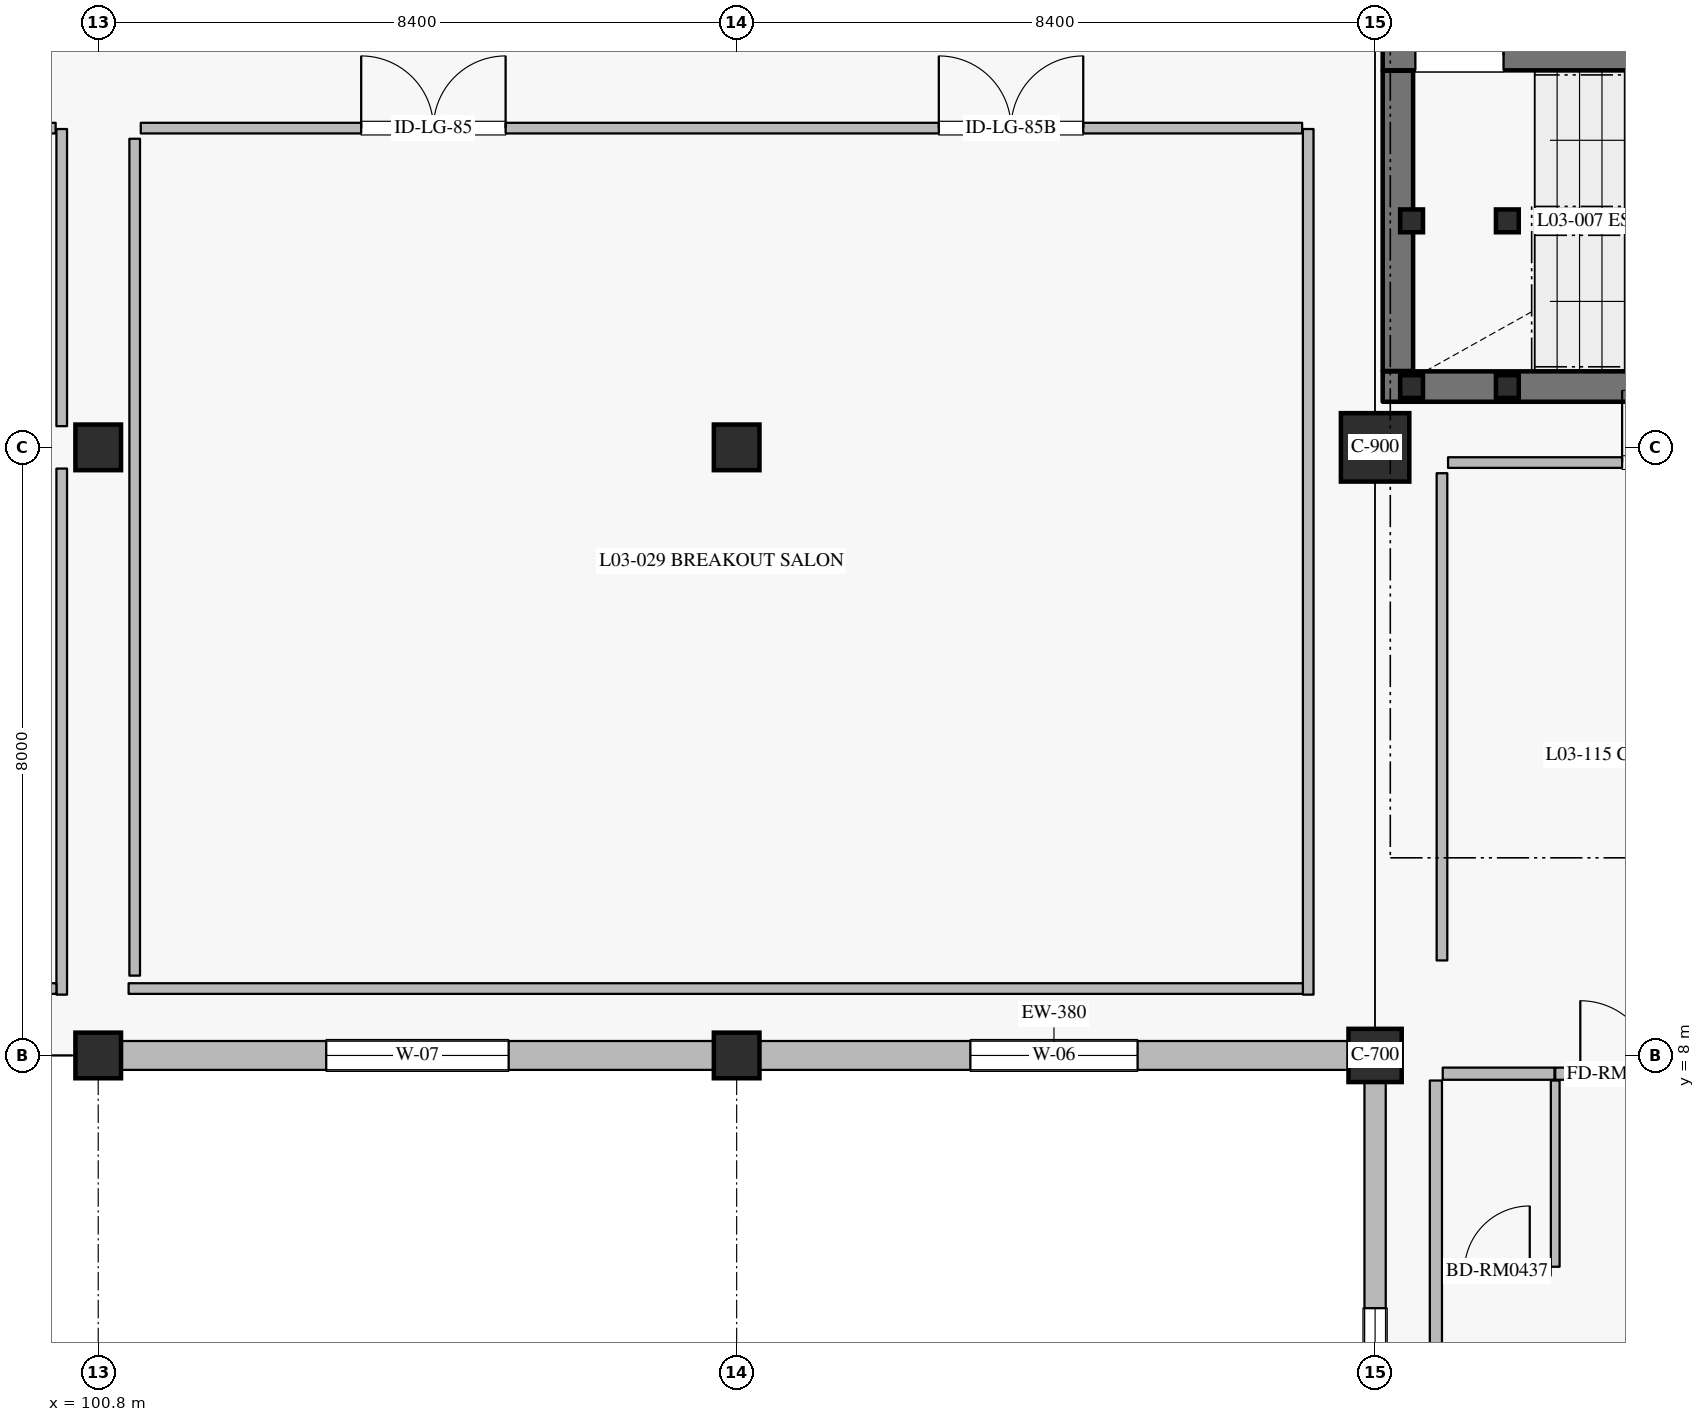
"""IFC4 building model, lengths in metres.
Left out: names, types, materials, properties, quantities, classifications, styles, units other than length and angle.
Written with IfcOpenShell. Run it as: python <this file> out.ifc"""

import sys

from ifc_helpers import new_model, si_unit, direction, frame, frame_2d, origin, origin_2d, place, context, subcontext, project, spatial, rectangle, hollow_rectangle, extrude, element, fill, save


model = new_model("IFC4")
c1 = context("Model", 3, precision=1e-05, world=origin(), true_north=direction((0.0, 1.0)))
c2 = subcontext(c1, "Body", "Model", "MODEL_VIEW")
j1 = project(units=[si_unit("LENGTHUNIT", "METRE"), si_unit("PLANEANGLEUNIT", "RADIAN")], contexts=[c1])
p1 = place(None, origin())
s1 = spatial("IfcSite", under=j1, at=p1, CompositionType="ELEMENT")
p2 = place(p1, origin())
s2 = spatial("IfcBuilding", under=s1, at=p2, CompositionType="ELEMENT")
p3 = place(p2, frame((0.0, 0.0, 16.2)))
s3 = spatial("IfcBuildingStorey", under=s2, at=p3, CompositionType="ELEMENT", Elevation=16.2)
for number, where, z_axis, x_axis in (
    (1, (100.8, 8.0, 0.0), (0.0, 0.0, 1.0), (1.0, 0.0, 0.0)),
    (2, (100.8, 16.0, 0.0), (0.0, 0.0, 1.0), (1.0, 0.0, 0.0)),
    (3, (109.2, 8.0, 0.0), (0.0, 0.0, 1.0), (1.0, 0.0, 0.0)),
    (4, (109.2, 16.0, 0.0), (0.0, 0.0, 1.0), (1.0, 0.0, 0.0)),
):
    element("IfcColumn", number, at=place(p3, frame(where, z_axis=z_axis, x_axis=x_axis)), inside=s3, PredefinedType="COLUMN", context=c2, shape_type="SweptSolid", body=[
        extrude(rectangle(XDim=0.6, YDim=0.6, at=origin_2d()), origin(), (0.0, 0.0, 1.0), 4.8),
    ])
p4 = place(p3, frame((117.6, 16.0, 0.0), z_axis=(0.0, 0.0, 1.0), x_axis=(1.0, 0.0, 0.0)))
e5 = element("IfcColumn", 5, at=p4, inside=s3, PredefinedType="COLUMN", context=c2, shape_type="SweptSolid", body=[
    extrude(rectangle(XDim=0.9, YDim=0.9, at=origin_2d()), origin(), (0.0, 0.0, 1.0), 4.8),
])
p5 = place(p3, frame((117.6, 8.0, 0.0), z_axis=(0.0, 0.0, 1.0), x_axis=(1.0, 0.0, 0.0)))
e6 = element("IfcColumn", 6, at=p5, inside=s3, PredefinedType="COLUMN", context=c2, shape_type="SweptSolid", body=[
    extrude(rectangle(XDim=0.7, YDim=0.7, at=origin_2d()), origin(), (0.0, 0.0, 1.0), 4.8),
])
p6 = place(p3, frame((117.25, 8.0, 0.0), z_axis=(0.0, 0.0, 1.0), x_axis=(-1.0, 0.0, 0.0)))
e7 = element("IfcWall", 7, at=p6, inside=s3, PredefinedType="SOLIDWALL", context=c2, shape_type="SweptSolid", body=[
    extrude(rectangle(XDim=7.75, YDim=0.38, at=frame_2d((3.875, 0.0))), origin(), (0.0, 0.0, 1.0), 3.84),
])
p7 = place(p6, frame((2.775, 0.0, 0.95)))
e8 = element("IfcOpeningElement", 8, at=p7, cuts=e7, PredefinedType="OPENING", context=c2, shape_type="SweptSolid", body=[
    extrude(rectangle(XDim=2.2, YDim=1.75, at=frame_2d((1.1, 0.875))), frame((0.0, 0.2, 0.0), z_axis=(0.0, -1.0, 0.0), x_axis=(1.0, 0.0, 0.0)), (0.0, 0.0, 1.0), 0.4),
])
p8 = place(p3, frame((108.9, 8.0, 0.0), z_axis=(0.0, 0.0, 1.0), x_axis=(-1.0, 0.0, 0.0)))
e9 = element("IfcWall", 9, at=p8, inside=s3, PredefinedType="SOLIDWALL", context=c2, shape_type="SweptSolid", body=[
    extrude(rectangle(XDim=7.8, YDim=0.38, at=frame_2d((3.9, 0.0))), origin(), (0.0, 0.0, 1.0), 3.84),
])
p9 = place(p8, frame((2.7, 0.0, 0.95)))
e10 = element("IfcOpeningElement", 10, at=p9, cuts=e9, PredefinedType="OPENING", context=c2, shape_type="SweptSolid", body=[
    extrude(rectangle(XDim=2.4, YDim=1.65, at=frame_2d((1.2, 0.825))), frame((0.0, 0.2, 0.0), z_axis=(0.0, -1.0, 0.0), x_axis=(1.0, 0.0, 0.0)), (0.0, 0.0, 1.0), 0.4),
])
p10 = place(p3, frame((117.6, 0.4, 0.0), z_axis=(0.0, 0.0, 1.0), x_axis=(0.0, 1.0, 0.0)))
e11 = element("IfcWall", 11, at=p10, inside=s3, PredefinedType="SOLIDWALL", context=c2, shape_type="SweptSolid", body=[
    extrude(rectangle(XDim=7.25, YDim=0.28, at=frame_2d((3.625, 0.0))), origin(), (0.0, 0.0, 1.0), 3.9),
])
p11 = place(p10, frame((2.975, 0.0, 0.75)))
e12 = element("IfcOpeningElement", 12, at=p11, cuts=e11, PredefinedType="OPENING", context=c2, shape_type="SweptSolid", body=[
    extrude(rectangle(XDim=1.3, YDim=1.65, at=frame_2d((0.65, 0.825))), frame((0.0, 0.15, 0.0), z_axis=(0.0, -1.0, 0.0), x_axis=(1.0, 0.0, 0.0)), (0.0, 0.0, 1.0), 0.3),
])
p12 = place(p3, frame((117.7, 16.8, 0.0), z_axis=(0.0, 0.0, 1.0), x_axis=(1.0, 0.0, 0.0)))
e13 = element("IfcWall", 13, at=p12, inside=s3, PredefinedType="SHEAR", context=c2, shape_type="SweptSolid", body=[
    extrude(rectangle(XDim=8.2, YDim=0.4, at=frame_2d((4.1, 0.0))), origin(), (0.0, 0.0, 1.0), 4.535),
])
p13 = place(p3, frame((117.7, 21.16, 0.0), z_axis=(0.0, 0.0, 1.0), x_axis=(1.0, 0.0, 0.0)))
e14 = element("IfcWall", 14, at=p13, inside=s3, PredefinedType="SHEAR", context=c2, shape_type="SweptSolid", body=[
    extrude(rectangle(XDim=8.2, YDim=0.4, at=frame_2d((4.1, 0.0))), origin(), (0.0, 0.0, 1.0), 4.535),
])
p14 = place(p13, frame((0.43, 0.0, 0.0)))
e15 = element("IfcOpeningElement", 15, at=p14, cuts=e14, PredefinedType="OPENING", context=c2, shape_type="SweptSolid", body=[
    extrude(rectangle(XDim=1.16, YDim=2.2, at=frame_2d((0.58, 1.1))), frame((0.0, 0.21, 0.0), z_axis=(0.0, -1.0, 0.0), x_axis=(1.0, 0.0, 0.0)), (0.0, 0.0, 1.0), 0.42),
])
p15 = place(p3, frame((117.9, 17.005, 0.0), z_axis=(0.0, 0.0, 1.0), x_axis=(0.0, 1.0, 0.0)))
e16 = element("IfcWall", 16, at=p15, inside=s3, PredefinedType="SHEAR", context=c2, shape_type="SweptSolid", body=[
    extrude(rectangle(XDim=3.95, YDim=0.4, at=frame_2d((1.975, 0.0))), origin(), (0.0, 0.0, 1.0), 4.535),
])
for number, where, z_axis, x_axis in (
    (17, (118.08, 16.8, 0.0), (0.0, 0.0, 1.0), (1.0, 0.0, 0.0)),
    (18, (118.08, 18.98, 0.0), (0.0, 0.0, 1.0), (1.0, 0.0, 0.0)),
    (19, (119.34, 16.8, 0.0), (0.0, 0.0, 1.0), (1.0, 0.0, 0.0)),
    (20, (119.34, 18.98, 0.0), (0.0, 0.0, 1.0), (1.0, 0.0, 0.0)),
):
    element("IfcColumn", number, at=place(p3, frame(where, z_axis=z_axis, x_axis=x_axis)), inside=s3, PredefinedType="COLUMN", context=c2, shape_type="SweptSolid", body=[
        extrude(hollow_rectangle(XDim=0.3, YDim=0.3, WallThickness=0.012, at=origin_2d()), origin(), (0.0, 0.0, 1.0), 4.62),
    ])
p16 = place(p3, frame((118.49, 7.76, 0.0), z_axis=(0.0, 0.0, 1.0), x_axis=(1.0, 0.0, 0.0)))
e21 = element("IfcWall", 21, at=p16, inside=s3, PredefinedType="PARTITIONING", context=c2, shape_type="SweptSolid", body=[
    extrude(rectangle(XDim=1.47, YDim=0.16, at=frame_2d((0.735, 0.0))), origin(), (0.0, 0.0, 1.0), 4.535),
])
p17 = place(p3, frame((119.97, 7.76, 0.0), z_axis=(0.0, 0.0, 1.0), x_axis=(1.0, 0.0, 0.0)))
e22 = element("IfcWall", 22, at=p17, inside=s3, PredefinedType="PARTITIONING", context=c2, shape_type="SweptSolid", body=[
    extrude(rectangle(XDim=1.62, YDim=0.16, at=frame_2d((0.81, 0.0))), origin(), (0.0, 0.0, 1.0), 4.535),
])
p18 = place(p17, frame((0.33, 0.0, 0.0)))
e23 = element("IfcOpeningElement", 23, at=p18, cuts=e22, PredefinedType="OPENING", context=c2, shape_type="SweptSolid", body=[
    extrude(rectangle(XDim=0.96, YDim=2.2, at=frame_2d((0.48, 1.1))), frame((0.0, 0.09, 0.0), z_axis=(0.0, -1.0, 0.0), x_axis=(1.0, 0.0, 0.0)), (0.0, 0.0, 1.0), 0.18),
])
p19 = place(p3, frame((119.97, 5.22, 0.0), z_axis=(0.0, 0.0, 1.0), x_axis=(0.0, 1.0, 0.0)))
e24 = element("IfcWall", 24, at=p19, inside=s3, PredefinedType="PARTITIONING", context=c2, shape_type="SweptSolid", body=[
    extrude(rectangle(XDim=2.45, YDim=0.115, at=frame_2d((1.225, 0.0))), origin(), (0.0, 0.0, 1.0), 4.535),
])
p20 = place(p3, frame((118.5, 5.16, 0.0), z_axis=(0.0, 0.0, 1.0), x_axis=(1.0, 0.0, 0.0)))
e25 = element("IfcWall", 25, at=p20, inside=s3, PredefinedType="PARTITIONING", context=c2, shape_type="SweptSolid", body=[
    extrude(rectangle(XDim=1.41, YDim=0.115, at=frame_2d((0.705, 0.0))), origin(), (0.0, 0.0, 1.0), 4.535),
])
p21 = place(p20, frame((0.275, 0.0, 0.0)))
e26 = element("IfcOpeningElement", 26, at=p21, cuts=e25, PredefinedType="OPENING", context=c2, shape_type="SweptSolid", body=[
    extrude(rectangle(XDim=0.86, YDim=2.12, at=frame_2d((0.43, 1.06))), frame((0.0, 0.067, 0.0), z_axis=(0.0, -1.0, 0.0), x_axis=(1.0, 0.0, 0.0)), (0.0, 0.0, 1.0), 0.135),
])
p22 = place(p3, frame((118.4, 0.34, 0.0), z_axis=(0.0, 0.0, 1.0), x_axis=(0.0, 1.0, 0.0)))
e27 = element("IfcWall", 27, at=p22, inside=s3, PredefinedType="PARTITIONING", context=c2, shape_type="SweptSolid", body=[
    extrude(rectangle(XDim=7.33, YDim=0.16, at=frame_2d((3.665, 0.0))), origin(), (0.0, 0.0, 1.0), 4.535),
])
p23 = place(p3, frame((84.56, 20.2, 0.0), z_axis=(0.0, 0.0, 1.0), x_axis=(1.0, 0.0, 0.0)))
e28 = element("IfcWall", 28, at=p23, inside=s3, PredefinedType="PARTITIONING", context=c2, shape_type="SweptSolid", body=[
    extrude(rectangle(XDim=15.68, YDim=0.14, at=frame_2d((7.84, 0.0))), origin(), (0.0, 0.0, 1.0), 4.535),
])
p24 = place(p23, frame((6.89, 0.0, 0.0)))
e29 = element("IfcOpeningElement", 29, at=p24, cuts=e28, PredefinedType="OPENING", context=c2, shape_type="SweptSolid", body=[
    extrude(rectangle(XDim=1.9, YDim=2.4, at=frame_2d((0.95, 1.2))), frame((0.0, 0.08, 0.0), z_axis=(0.0, -1.0, 0.0), x_axis=(1.0, 0.0, 0.0)), (0.0, 0.0, 1.0), 0.16),
])
p25 = place(p3, frame((101.36, 20.2, 0.0), z_axis=(0.0, 0.0, 1.0), x_axis=(1.0, 0.0, 0.0)))
e30 = element("IfcWall", 30, at=p25, inside=s3, PredefinedType="PARTITIONING", context=c2, shape_type="SweptSolid", body=[
    extrude(rectangle(XDim=15.28, YDim=0.14, at=frame_2d((7.64, 0.0))), origin(), (0.0, 0.0, 1.0), 4.535),
])
p26 = place(p25, frame((2.9, 0.0, 0.0)))
e31 = element("IfcOpeningElement", 31, at=p26, cuts=e30, PredefinedType="OPENING", context=c2, shape_type="SweptSolid", body=[
    extrude(rectangle(XDim=1.9, YDim=2.4, at=frame_2d((0.95, 1.2))), frame((0.0, 0.08, 0.0), z_axis=(0.0, -1.0, 0.0), x_axis=(1.0, 0.0, 0.0)), (0.0, 0.0, 1.0), 0.16),
])
p27 = place(p25, frame((10.5, 0.0, 0.0)))
e32 = element("IfcOpeningElement", 32, at=p27, cuts=e30, PredefinedType="OPENING", context=c2, shape_type="SweptSolid", body=[
    extrude(rectangle(XDim=1.9, YDim=2.4, at=frame_2d((0.95, 1.2))), frame((0.0, 0.08, 0.0), z_axis=(0.0, -1.0, 0.0), x_axis=(1.0, 0.0, 0.0)), (0.0, 0.0, 1.0), 0.16),
])
p28 = place(p3, frame((101.28, 9.05, 0.0), z_axis=(0.0, 0.0, 1.0), x_axis=(0.0, 1.0, 0.0)))
e33 = element("IfcWall", 33, at=p28, inside=s3, PredefinedType="PARTITIONING", context=c2, shape_type="SweptSolid", body=[
    extrude(rectangle(XDim=11.01, YDim=0.14, at=frame_2d((5.505, 0.0))), origin(), (0.0, 0.0, 1.0), 4.535),
])
p29 = place(p3, frame((118.56, 15.8, 0.0), z_axis=(0.0, 0.0, 1.0), x_axis=(1.0, 0.0, 0.0)))
e34 = element("IfcWall", 34, at=p29, inside=s3, PredefinedType="PARTITIONING", context=c2, shape_type="SweptSolid", body=[
    extrude(rectangle(XDim=6.48, YDim=0.14, at=frame_2d((3.24, 0.0))), origin(), (0.0, 0.0, 1.0), 4.535),
])
p30 = place(p29, frame((2.29, 0.0, 0.0)))
e35 = element("IfcOpeningElement", 35, at=p30, cuts=e34, PredefinedType="OPENING", context=c2, shape_type="SweptSolid", body=[
    extrude(rectangle(XDim=1.9, YDim=2.4, at=frame_2d((0.95, 1.2))), frame((0.0, 0.08, 0.0), z_axis=(0.0, -1.0, 0.0), x_axis=(1.0, 0.0, 0.0)), (0.0, 0.0, 1.0), 0.16),
])
p31 = place(p3, frame((118.48, 9.25, 0.0), z_axis=(0.0, 0.0, 1.0), x_axis=(0.0, 1.0, 0.0)))
e36 = element("IfcWall", 36, at=p31, inside=s3, PredefinedType="PARTITIONING", context=c2, shape_type="SweptSolid", body=[
    extrude(rectangle(XDim=6.41, YDim=0.14, at=frame_2d((3.205, 0.0))), origin(), (0.0, 0.0, 1.0), 4.535),
])
p32 = place(p3, frame((100.32, 8.8, 0.0), z_axis=(0.0, 0.0, 1.0), x_axis=(0.0, 1.0, 0.0)))
e37 = element("IfcWall", 37, at=p32, inside=s3, PredefinedType="PARTITIONING", context=c2, shape_type="SweptSolid", body=[
    extrude(rectangle(XDim=6.921, YDim=0.14, at=frame_2d((3.46, 0.0))), origin(), (0.0, 0.0, 1.0), 4.535),
])
p33 = place(p3, frame((100.32, 16.279, 0.0), z_axis=(0.0, 0.0, 1.0), x_axis=(0.0, 1.0, 0.0)))
e38 = element("IfcWall", 38, at=p33, inside=s3, PredefinedType="PARTITIONING", context=c2, shape_type="SweptSolid", body=[
    extrude(rectangle(XDim=3.909, YDim=0.14, at=frame_2d((1.955, 0.0))), origin(), (0.0, 0.0, 1.0), 4.535),
])
p34 = place(p3, frame((84.4, 8.88, 0.0), z_axis=(0.0, 0.0, 1.0), x_axis=(1.0, 0.0, 0.0)))
e39 = element("IfcWall", 39, at=p34, inside=s3, PredefinedType="PARTITIONING", context=c2, shape_type="SweptSolid", body=[
    extrude(rectangle(XDim=15.85, YDim=0.14, at=frame_2d((7.925, 0.0))), origin(), (0.0, 0.0, 1.0), 4.535),
])
p35 = place(p3, frame((116.72, 8.8, 0.0), z_axis=(0.0, 0.0, 1.0), x_axis=(0.0, 1.0, 0.0)))
e40 = element("IfcWall", 40, at=p35, inside=s3, PredefinedType="PARTITIONING", context=c2, shape_type="SweptSolid", body=[
    extrude(rectangle(XDim=11.388, YDim=0.14, at=frame_2d((5.694, 0.0))), origin(), (0.0, 0.0, 1.0), 4.535),
])
p36 = place(p3, frame((101.2, 8.88, 0.0), z_axis=(0.0, 0.0, 1.0), x_axis=(1.0, 0.0, 0.0)))
e41 = element("IfcWall", 41, at=p36, inside=s3, PredefinedType="PARTITIONING", context=c2, shape_type="SweptSolid", body=[
    extrude(rectangle(XDim=15.45, YDim=0.14, at=frame_2d((7.725, 0.0))), origin(), (0.0, 0.0, 1.0), 4.535),
])
p37 = place(p7, origin())
e42 = element("IfcWindow", 42, at=p37, inside=s3, PartitioningType="DOUBLE_PANEL_VERTICAL", PredefinedType="WINDOW", context=c2, shape_type="SweptSolid", body=[
    extrude(rectangle(XDim=2.2, YDim=1.75, at=frame_2d((1.1, 0.875))), frame((0.0, 0.03, 0.0), z_axis=(0.0, -1.0, 0.0), x_axis=(1.0, 0.0, 0.0)), (0.0, 0.0, 1.0), 0.06),
])
fill(e8, e42)
p38 = place(p9, origin())
e43 = element("IfcWindow", 43, at=p38, inside=s3, PartitioningType="DOUBLE_PANEL_VERTICAL", PredefinedType="WINDOW", context=c2, shape_type="SweptSolid", body=[
    extrude(rectangle(XDim=2.4, YDim=1.65, at=frame_2d((1.2, 0.825))), frame((0.0, 0.03, 0.0), z_axis=(0.0, -1.0, 0.0), x_axis=(1.0, 0.0, 0.0)), (0.0, 0.0, 1.0), 0.06),
])
fill(e10, e43)
p39 = place(p11, origin())
e44 = element("IfcWindow", 44, at=p39, inside=s3, PartitioningType="SINGLE_PANEL", PredefinedType="WINDOW", context=c2, shape_type="SweptSolid", body=[
    extrude(rectangle(XDim=1.3, YDim=1.65, at=frame_2d((0.65, 0.825))), frame((0.0, 0.03, 0.0), z_axis=(0.0, -1.0, 0.0), x_axis=(1.0, 0.0, 0.0)), (0.0, 0.0, 1.0), 0.06),
])
fill(e12, e44)
p40 = place(p14, origin())
e45 = element("IfcDoor", 45, at=p40, inside=s3, OperationType="SINGLE_SWING_RIGHT", PredefinedType="DOOR", context=c2, shape_type="SweptSolid", body=[
    extrude(rectangle(XDim=1.16, YDim=2.2, at=frame_2d((0.58, 1.1))), frame((0.0, 0.025, 0.0), z_axis=(0.0, -1.0, 0.0), x_axis=(1.0, 0.0, 0.0)), (0.0, 0.0, 1.0), 0.05),
])
fill(e15, e45)
p41 = place(p18, origin())
e46 = element("IfcDoor", 46, at=p41, inside=s3, OperationType="SINGLE_SWING_LEFT", PredefinedType="DOOR", context=c2, shape_type="SweptSolid", body=[
    extrude(rectangle(XDim=0.96, YDim=2.2, at=frame_2d((0.48, 1.1))), frame((0.0, 0.025, 0.0), z_axis=(0.0, -1.0, 0.0), x_axis=(1.0, 0.0, 0.0)), (0.0, 0.0, 1.0), 0.05),
])
fill(e23, e46)
p42 = place(p21, origin())
e47 = element("IfcDoor", 47, at=p42, inside=s3, OperationType="SINGLE_SWING_RIGHT", PredefinedType="DOOR", context=c2, shape_type="SweptSolid", body=[
    extrude(rectangle(XDim=0.86, YDim=2.12, at=frame_2d((0.43, 1.06))), frame((0.0, 0.025, 0.0), z_axis=(0.0, -1.0, 0.0), x_axis=(1.0, 0.0, 0.0)), (0.0, 0.0, 1.0), 0.05),
])
fill(e26, e47)
p43 = place(p26, origin())
e48 = element("IfcDoor", 48, at=p43, inside=s3, OperationType="DOUBLE_DOOR_SINGLE_SWING", PredefinedType="DOOR", context=c2, shape_type="SweptSolid", body=[
    extrude(rectangle(XDim=1.9, YDim=2.4, at=frame_2d((0.95, 1.2))), frame((0.0, 0.025, 0.0), z_axis=(0.0, -1.0, 0.0), x_axis=(1.0, 0.0, 0.0)), (0.0, 0.0, 1.0), 0.05),
])
fill(e31, e48)
p44 = place(p30, origin())
e49 = element("IfcDoor", 49, at=p44, inside=s3, OperationType="DOUBLE_DOOR_SINGLE_SWING", PredefinedType="DOOR", context=c2, shape_type="SweptSolid", body=[
    extrude(rectangle(XDim=1.9, YDim=2.4, at=frame_2d((0.95, 1.2))), frame((0.0, 0.025, 0.0), z_axis=(0.0, -1.0, 0.0), x_axis=(1.0, 0.0, 0.0)), (0.0, 0.0, 1.0), 0.05),
])
fill(e35, e49)
p45 = place(p27, origin())
e50 = element("IfcDoor", 50, at=p45, inside=s3, OperationType="DOUBLE_DOOR_SINGLE_SWING", PredefinedType="DOOR", context=c2, shape_type="SweptSolid", body=[
    extrude(rectangle(XDim=1.9, YDim=2.4, at=frame_2d((0.95, 1.2))), frame((0.0, 0.025, 0.0), z_axis=(0.0, -1.0, 0.0), x_axis=(1.0, 0.0, 0.0)), (0.0, 0.0, 1.0), 0.05),
])
fill(e32, e50)
save(model, sys.argv[1])
